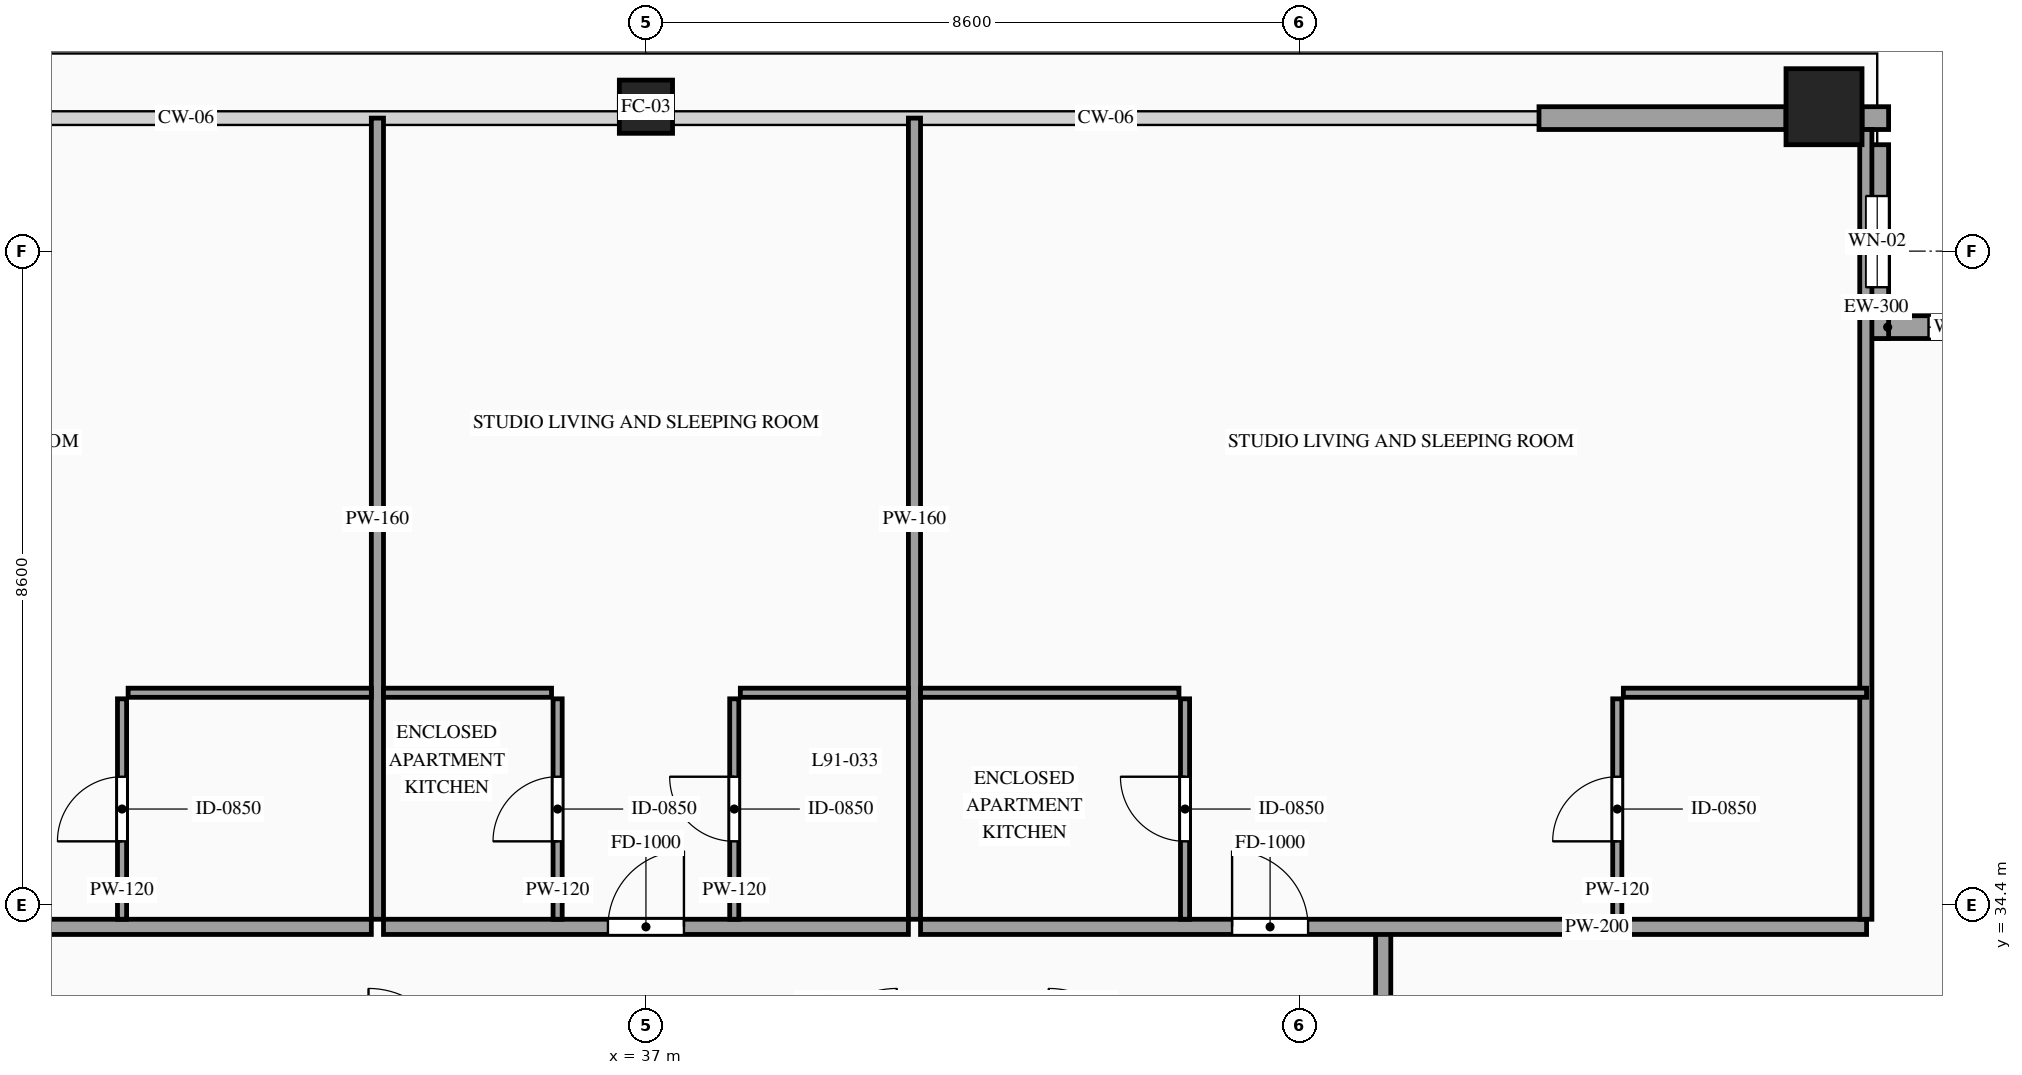
"""IFC4 building model, lengths in metres.
Left out: names, types, materials, properties, quantities, classifications, styles, units other than length and angle.
Written with IfcOpenShell. Run it as: python <this file> out.ifc"""

import sys

from ifc_helpers import new_model, si_unit, direction, frame, frame_2d, origin, origin_2d, place, context, subcontext, project, spatial, rectangle, hollow_rectangle, extrude, source, transform, mapped, element, fill, save


model = new_model("IFC4")
c1 = context("Model", 3, precision=1e-05, world=origin(), true_north=direction((0.0, 1.0)))
c2 = subcontext(c1, "Body", "Model", "MODEL_VIEW")
j1 = project(units=[si_unit("LENGTHUNIT", "METRE"), si_unit("PLANEANGLEUNIT", "RADIAN")], contexts=[c1])
p1 = place(None, origin())
s1 = spatial("IfcSite", under=j1, at=p1, CompositionType="ELEMENT")
p2 = place(p1, origin())
s2 = spatial("IfcBuilding", under=s1, at=p2, CompositionType="ELEMENT")
p3 = place(p2, frame((0.0, 0.0, 339.2)))
s3 = spatial("IfcBuildingStorey", under=s2, at=p3, CompositionType="ELEMENT", Elevation=339.2)
m1 = source(origin(), c2, "Body", "SweptSolid", [
    extrude(hollow_rectangle(XDim=0.7, YDim=0.7, WallThickness=0.032, at=origin_2d()), origin(), (0.0, 0.0, 1.0), 4.0),
])
p4 = place(p3, frame((37.0, 44.9, 0.0), z_axis=(0.0, 0.0, 1.0), x_axis=(1.0, 0.0, 0.0)))
e1 = element("IfcColumn", 1, at=p4, inside=s3, PredefinedType="COLUMN", context=c2, shape_type="MappedRepresentation", body=[
    mapped(m1, transform((0.0, 0.0, 0.0), scale=1.0)),
])
m2 = source(origin(), c2, "Body", "SweptSolid", [
    extrude(hollow_rectangle(XDim=1.0, YDim=1.0, WallThickness=0.048, at=origin_2d()), origin(), (0.0, 0.0, 1.0), 4.0),
])
p5 = place(p3, frame((52.5, 44.9, 0.0), z_axis=(0.0, 0.0, 1.0), x_axis=(1.0, 0.0, 0.0)))
e2 = element("IfcColumn", 2, at=p5, inside=s3, PredefinedType="COLUMN", context=c2, shape_type="MappedRepresentation", body=[
    mapped(m2, transform((0.0, 0.0, 0.0), scale=1.0)),
])
p6 = place(p3, frame((55.6, 42.0, 0.0), z_axis=(0.0, 0.0, 1.0), x_axis=(-1.0, 0.0, 0.0)))
e3 = element("IfcWall", 3, at=p6, inside=s3, PredefinedType="SOLIDWALL", context=c2, shape_type="SweptSolid", body=[
    extrude(rectangle(XDim=2.55, YDim=0.3, at=frame_2d((1.275, 0.0))), origin(), (0.0, 0.0, 1.0), 3.76),
])
p7 = place(p6, frame((0.825, 0.0, 0.85)))
e4 = element("IfcOpeningElement", 4, at=p7, cuts=e3, PredefinedType="OPENING", context=c2, shape_type="SweptSolid", body=[
    extrude(rectangle(XDim=0.9, YDim=1.5, at=frame_2d((0.45, 0.75))), frame((0.0, 0.165, 0.0), z_axis=(0.0, -1.0, 0.0), x_axis=(1.0, 0.0, 0.0)), (0.0, 0.0, 1.0), 0.33),
])
p8 = place(p3, frame((53.2, 41.85, 0.0), z_axis=(0.0, 0.0, 1.0), x_axis=(0.0, 1.0, 0.0)))
e5 = element("IfcWall", 5, at=p8, inside=s3, PredefinedType="SOLIDWALL", context=c2, shape_type="SweptSolid", body=[
    extrude(rectangle(XDim=2.55, YDim=0.3, at=frame_2d((1.275, 0.0))), origin(), (0.0, 0.0, 1.0), 3.76),
])
p9 = place(p8, frame((0.675, 0.0, 0.85)))
e6 = element("IfcOpeningElement", 6, at=p9, cuts=e5, PredefinedType="OPENING", context=c2, shape_type="SweptSolid", body=[
    extrude(rectangle(XDim=1.2, YDim=2.1, at=frame_2d((0.6, 1.05))), frame((0.0, 0.165, 0.0), z_axis=(0.0, -1.0, 0.0), x_axis=(1.0, 0.0, 0.0)), (0.0, 0.0, 1.0), 0.33),
])
m3 = source(origin(), c2, "Body", "SweptSolid", [
    extrude(rectangle(XDim=0.35, YDim=0.3, at=frame_2d((0.175, 0.0))), origin(), (0.0, 0.0, 1.0), 3.76),
])
p10 = place(p3, frame((53.0, 44.75, 0.0), z_axis=(0.0, 0.0, 1.0), x_axis=(1.0, 0.0, 0.0)))
e7 = element("IfcWall", 7, at=p10, inside=s3, PredefinedType="SOLIDWALL", context=c2, shape_type="MappedRepresentation", body=[
    mapped(m3, transform((0.0, 0.0, 0.0), scale=1.0)),
])
m4 = source(origin(), c2, "Body", "SweptSolid", [
    extrude(rectangle(XDim=3.25, YDim=0.3, at=frame_2d((1.625, 0.0))), origin(), (0.0, 0.0, 1.0), 3.365),
])
p11 = place(p3, frame((48.75, 44.75, 0.0), z_axis=(0.0, 0.0, 1.0), x_axis=(1.0, 0.0, 0.0)))
e8 = element("IfcWall", 8, at=p11, inside=s3, PredefinedType="SOLIDWALL", context=c2, shape_type="MappedRepresentation", body=[
    mapped(m4, transform((0.0, 0.0, 0.0), scale=1.0)),
])
m5 = source(origin(), c2, "Body", "SweptSolid", [
    extrude(rectangle(XDim=1.7, YDim=0.2, at=frame_2d((0.85, 0.0))), origin(), (0.0, 0.0, 1.0), 3.76),
])
p12 = place(p3, frame((46.7, 32.35, 0.0), z_axis=(0.0, 0.0, 1.0), x_axis=(0.0, 1.0, 0.0)))
e9 = element("IfcWall", 9, at=p12, inside=s3, PredefinedType="PARTITIONING", context=c2, shape_type="MappedRepresentation", body=[
    mapped(m5, transform((0.0, 0.0, 0.0), scale=1.0)),
])
p13 = place(p3, frame((20.94, 34.11, 0.0), z_axis=(0.0, 0.0, 1.0), x_axis=(1.0, 0.0, 0.0)))
e10 = element("IfcWall", 10, at=p13, inside=s3, PredefinedType="PARTITIONING", context=c2, shape_type="SweptSolid", body=[
    extrude(rectangle(XDim=12.447, YDim=0.2, at=frame_2d((6.224, 0.0))), origin(), (0.0, 0.0, 1.0), 3.76),
])
p14 = place(p13, frame((5.824, 0.0, 0.0)))
e11 = element("IfcOpeningElement", 11, at=p14, cuts=e10, PredefinedType="OPENING", context=c2, shape_type="SweptSolid", body=[
    extrude(rectangle(XDim=1.0, YDim=2.2, at=frame_2d((0.5, 1.1))), frame((0.0, 0.115, 0.0), z_axis=(0.0, -1.0, 0.0), x_axis=(1.0, 0.0, 0.0)), (0.0, 0.0, 1.0), 0.23),
])
m6 = source(origin(), c2, "Body", "SweptSolid", [
    extrude(rectangle(XDim=10.54, YDim=0.16, at=frame_2d((5.27, 0.0))), origin(), (0.0, 0.0, 1.0), 3.76),
])
p15 = place(p3, frame((33.467, 34.21, 0.0), z_axis=(0.0, 0.0, 1.0), x_axis=(0.0, 1.0, 0.0)))
e12 = element("IfcWall", 12, at=p15, inside=s3, PredefinedType="PARTITIONING", context=c2, shape_type="MappedRepresentation", body=[
    mapped(m6, transform((0.0, 0.0, 0.0), scale=1.0)),
])
m7 = source(origin(), c2, "Body", "SweptSolid", [
    extrude(rectangle(XDim=3.2, YDim=0.12, at=frame_2d((1.6, 0.0))), origin(), (0.0, 0.0, 1.0), 3.76),
])
p16 = place(p3, frame((30.187, 37.19, 0.0), z_axis=(0.0, 0.0, 1.0), x_axis=(1.0, 0.0, 0.0)))
e13 = element("IfcWall", 13, at=p16, inside=s3, PredefinedType="PARTITIONING", context=c2, shape_type="MappedRepresentation", body=[
    mapped(m7, transform((0.0, 0.0, 0.0), scale=1.0)),
])
p17 = place(p3, frame((30.107, 34.21, 0.0), z_axis=(0.0, 0.0, 1.0), x_axis=(0.0, 1.0, 0.0)))
e14 = element("IfcWall", 14, at=p17, inside=s3, PredefinedType="PARTITIONING", context=c2, shape_type="SweptSolid", body=[
    extrude(rectangle(XDim=2.9, YDim=0.12, at=frame_2d((1.45, 0.0))), origin(), (0.0, 0.0, 1.0), 3.76),
])
p18 = place(p17, frame((1.025, 0.0, 0.0)))
e15 = element("IfcOpeningElement", 15, at=p18, cuts=e14, PredefinedType="OPENING", context=c2, shape_type="SweptSolid", body=[
    extrude(rectangle(XDim=0.85, YDim=2.1, at=frame_2d((0.425, 1.05))), frame((0.0, 0.075, 0.0), z_axis=(0.0, -1.0, 0.0), x_axis=(1.0, 0.0, 0.0)), (0.0, 0.0, 1.0), 0.15),
])
p19 = place(p3, frame((33.547, 34.11, 0.0), z_axis=(0.0, 0.0, 1.0), x_axis=(1.0, 0.0, 0.0)))
e16 = element("IfcWall", 16, at=p19, inside=s3, PredefinedType="PARTITIONING", context=c2, shape_type="SweptSolid", body=[
    extrude(rectangle(XDim=6.906, YDim=0.2, at=frame_2d((3.453, 0.0))), origin(), (0.0, 0.0, 1.0), 3.76),
])
p20 = place(p19, frame((2.953, 0.0, 0.0)))
e17 = element("IfcOpeningElement", 17, at=p20, cuts=e16, PredefinedType="OPENING", context=c2, shape_type="SweptSolid", body=[
    extrude(rectangle(XDim=1.0, YDim=2.2, at=frame_2d((0.5, 1.1))), frame((0.0, 0.115, 0.0), z_axis=(0.0, -1.0, 0.0), x_axis=(1.0, 0.0, 0.0)), (0.0, 0.0, 1.0), 0.23),
])
p21 = place(p3, frame((40.533, 34.21, 0.0), z_axis=(0.0, 0.0, 1.0), x_axis=(0.0, 1.0, 0.0)))
e18 = element("IfcWall", 18, at=p21, inside=s3, PredefinedType="PARTITIONING", context=c2, shape_type="MappedRepresentation", body=[
    mapped(m6, transform((0.0, 0.0, 0.0), scale=1.0)),
])
m8 = source(origin(), c2, "Body", "SweptSolid", [
    extrude(rectangle(XDim=2.211, YDim=0.12, at=frame_2d((1.105, 0.0))), origin(), (0.0, 0.0, 1.0), 3.76),
])
p22 = place(p3, frame((33.547, 37.19, 0.0), z_axis=(0.0, 0.0, 1.0), x_axis=(1.0, 0.0, 0.0)))
e19 = element("IfcWall", 19, at=p22, inside=s3, PredefinedType="PARTITIONING", context=c2, shape_type="MappedRepresentation", body=[
    mapped(m8, transform((0.0, 0.0, 0.0), scale=1.0)),
])
p23 = place(p3, frame((35.838, 34.21, 0.0), z_axis=(0.0, 0.0, 1.0), x_axis=(0.0, 1.0, 0.0)))
e20 = element("IfcWall", 20, at=p23, inside=s3, PredefinedType="PARTITIONING", context=c2, shape_type="SweptSolid", body=[
    extrude(rectangle(XDim=2.9, YDim=0.12, at=frame_2d((1.45, 0.0))), origin(), (0.0, 0.0, 1.0), 3.76),
])
p24 = place(p23, frame((1.025, 0.0, 0.0)))
e21 = element("IfcOpeningElement", 21, at=p24, cuts=e20, PredefinedType="OPENING", context=c2, shape_type="SweptSolid", body=[
    extrude(rectangle(XDim=0.85, YDim=2.1, at=frame_2d((0.425, 1.05))), frame((0.0, 0.075, 0.0), z_axis=(0.0, -1.0, 0.0), x_axis=(1.0, 0.0, 0.0)), (0.0, 0.0, 1.0), 0.15),
])
p25 = place(p3, frame((38.242, 37.19, 0.0), z_axis=(0.0, 0.0, 1.0), x_axis=(1.0, 0.0, 0.0)))
e22 = element("IfcWall", 22, at=p25, inside=s3, PredefinedType="PARTITIONING", context=c2, shape_type="MappedRepresentation", body=[
    mapped(m8, transform((0.0, 0.0, 0.0), scale=1.0)),
])
p26 = place(p3, frame((38.162, 34.21, 0.0), z_axis=(0.0, 0.0, 1.0), x_axis=(0.0, 1.0, 0.0)))
e23 = element("IfcWall", 23, at=p26, inside=s3, PredefinedType="PARTITIONING", context=c2, shape_type="SweptSolid", body=[
    extrude(rectangle(XDim=2.9, YDim=0.12, at=frame_2d((1.45, 0.0))), origin(), (0.0, 0.0, 1.0), 3.76),
])
p27 = place(p26, frame((1.025, 0.0, 0.0)))
e24 = element("IfcOpeningElement", 24, at=p27, cuts=e23, PredefinedType="OPENING", context=c2, shape_type="SweptSolid", body=[
    extrude(rectangle(XDim=0.85, YDim=2.1, at=frame_2d((0.425, 1.05))), frame((0.0, 0.075, 0.0), z_axis=(0.0, -1.0, 0.0), x_axis=(1.0, 0.0, 0.0)), (0.0, 0.0, 1.0), 0.15),
])
p28 = place(p3, frame((40.613, 34.11, 0.0), z_axis=(0.0, 0.0, 1.0), x_axis=(1.0, 0.0, 0.0)))
e25 = element("IfcWall", 25, at=p28, inside=s3, PredefinedType="PARTITIONING", context=c2, shape_type="SweptSolid", body=[
    extrude(rectangle(XDim=12.447, YDim=0.2, at=frame_2d((6.224, 0.0))), origin(), (0.0, 0.0, 1.0), 3.76),
])
p29 = place(p28, frame((4.099, 0.0, 0.0)))
e26 = element("IfcOpeningElement", 26, at=p29, cuts=e25, PredefinedType="OPENING", context=c2, shape_type="SweptSolid", body=[
    extrude(rectangle(XDim=1.0, YDim=2.2, at=frame_2d((0.5, 1.1))), frame((0.0, 0.115, 0.0), z_axis=(0.0, -1.0, 0.0), x_axis=(1.0, 0.0, 0.0)), (0.0, 0.0, 1.0), 0.23),
])
m9 = source(origin(), c2, "Body", "SweptSolid", [
    extrude(rectangle(XDim=10.39, YDim=0.16, at=frame_2d((5.195, 0.0))), origin(), (0.0, 0.0, 1.0), 3.76),
])
p30 = place(p3, frame((53.05, 34.21, 0.0), z_axis=(0.0, 0.0, 1.0), x_axis=(0.0, 1.0, 0.0)))
e27 = element("IfcWall", 27, at=p30, inside=s3, PredefinedType="PARTITIONING", context=c2, shape_type="MappedRepresentation", body=[
    mapped(m9, transform((0.0, 0.0, 0.0), scale=1.0)),
])
m10 = source(origin(), c2, "Body", "SweptSolid", [
    extrude(rectangle(XDim=3.4, YDim=0.12, at=frame_2d((1.7, 0.0))), origin(), (0.0, 0.0, 1.0), 3.76),
])
p31 = place(p3, frame((40.613, 37.19, 0.0), z_axis=(0.0, 0.0, 1.0), x_axis=(1.0, 0.0, 0.0)))
e28 = element("IfcWall", 28, at=p31, inside=s3, PredefinedType="PARTITIONING", context=c2, shape_type="MappedRepresentation", body=[
    mapped(m10, transform((0.0, 0.0, 0.0), scale=1.0)),
])
p32 = place(p3, frame((44.093, 34.21, 0.0), z_axis=(0.0, 0.0, 1.0), x_axis=(0.0, 1.0, 0.0)))
e29 = element("IfcWall", 29, at=p32, inside=s3, PredefinedType="PARTITIONING", context=c2, shape_type="SweptSolid", body=[
    extrude(rectangle(XDim=2.9, YDim=0.12, at=frame_2d((1.45, 0.0))), origin(), (0.0, 0.0, 1.0), 3.76),
])
p33 = place(p32, frame((1.025, 0.0, 0.0)))
e30 = element("IfcOpeningElement", 30, at=p33, cuts=e29, PredefinedType="OPENING", context=c2, shape_type="SweptSolid", body=[
    extrude(rectangle(XDim=0.85, YDim=2.1, at=frame_2d((0.425, 1.05))), frame((0.0, 0.075, 0.0), z_axis=(0.0, -1.0, 0.0), x_axis=(1.0, 0.0, 0.0)), (0.0, 0.0, 1.0), 0.15),
])
p34 = place(p3, frame((49.86, 37.19, 0.0), z_axis=(0.0, 0.0, 1.0), x_axis=(1.0, 0.0, 0.0)))
e31 = element("IfcWall", 31, at=p34, inside=s3, PredefinedType="PARTITIONING", context=c2, shape_type="MappedRepresentation", body=[
    mapped(m7, transform((0.0, 0.0, 0.0), scale=1.0)),
])
p35 = place(p3, frame((49.78, 34.21, 0.0), z_axis=(0.0, 0.0, 1.0), x_axis=(0.0, 1.0, 0.0)))
e32 = element("IfcWall", 32, at=p35, inside=s3, PredefinedType="PARTITIONING", context=c2, shape_type="SweptSolid", body=[
    extrude(rectangle(XDim=2.9, YDim=0.12, at=frame_2d((1.45, 0.0))), origin(), (0.0, 0.0, 1.0), 3.76),
])
p36 = place(p35, frame((1.025, 0.0, 0.0)))
e33 = element("IfcOpeningElement", 33, at=p36, cuts=e32, PredefinedType="OPENING", context=c2, shape_type="SweptSolid", body=[
    extrude(rectangle(XDim=0.85, YDim=2.1, at=frame_2d((0.425, 1.05))), frame((0.0, 0.075, 0.0), z_axis=(0.0, -1.0, 0.0), x_axis=(1.0, 0.0, 0.0)), (0.0, 0.0, 1.0), 0.15),
])
m11 = source(origin(), c2, "Body", "SweptSolid", [
    extrude(rectangle(XDim=0.9, YDim=1.5, at=frame_2d((0.45, 0.75))), frame((0.0, 0.03, 0.0), z_axis=(0.0, -1.0, 0.0), x_axis=(1.0, 0.0, 0.0)), (0.0, 0.0, 1.0), 0.06),
])
p37 = place(p7, origin())
e34 = element("IfcWindow", 34, at=p37, inside=s3, PartitioningType="SINGLE_PANEL", PredefinedType="WINDOW", context=c2, shape_type="MappedRepresentation", body=[
    mapped(m11, transform((0.0, 0.0, 0.0), scale=1.0)),
])
fill(e4, e34)
m12 = source(origin(), c2, "Body", "SweptSolid", [
    extrude(rectangle(XDim=1.2, YDim=2.1, at=frame_2d((0.6, 1.05))), frame((0.0, 0.03, 0.0), z_axis=(0.0, -1.0, 0.0), x_axis=(1.0, 0.0, 0.0)), (0.0, 0.0, 1.0), 0.06),
])
p38 = place(p9, origin())
e35 = element("IfcWindow", 35, at=p38, inside=s3, PartitioningType="SINGLE_PANEL", PredefinedType="WINDOW", context=c2, shape_type="MappedRepresentation", body=[
    mapped(m12, transform((0.0, 0.0, 0.0), scale=1.0)),
])
fill(e6, e35)
m13 = source(origin(), c2, "Body", "SweptSolid", [
    extrude(rectangle(XDim=0.85, YDim=2.1, at=frame_2d((0.425, 1.05))), frame((0.0, 0.025, 0.0), z_axis=(0.0, -1.0, 0.0), x_axis=(1.0, 0.0, 0.0)), (0.0, 0.0, 1.0), 0.05),
])
p39 = place(p18, origin())
e36 = element("IfcDoor", 36, at=p39, inside=s3, OperationType="SINGLE_SWING_LEFT", PredefinedType="DOOR", context=c2, shape_type="MappedRepresentation", body=[
    mapped(m13, transform((0.0, 0.0, 0.0), scale=1.0)),
])
fill(e15, e36)
m14 = source(origin(), c2, "Body", "SweptSolid", [
    extrude(rectangle(XDim=1.0, YDim=2.2, at=frame_2d((0.5, 1.1))), frame((0.0, 0.025, 0.0), z_axis=(0.0, -1.0, 0.0), x_axis=(1.0, 0.0, 0.0)), (0.0, 0.0, 1.0), 0.05),
])
p40 = place(p20, origin())
e37 = element("IfcDoor", 37, at=p40, inside=s3, OperationType="SINGLE_SWING_RIGHT", PredefinedType="DOOR", context=c2, shape_type="MappedRepresentation", body=[
    mapped(m14, transform((0.0, 0.0, 0.0), scale=1.0)),
])
fill(e17, e37)
p41 = place(p24, origin())
e38 = element("IfcDoor", 38, at=p41, inside=s3, OperationType="SINGLE_SWING_LEFT", PredefinedType="DOOR", context=c2, shape_type="MappedRepresentation", body=[
    mapped(m13, transform((0.0, 0.0, 0.0), scale=1.0)),
])
fill(e21, e38)
p42 = place(p27, origin())
e39 = element("IfcDoor", 39, at=p42, inside=s3, OperationType="SINGLE_SWING_RIGHT", PredefinedType="DOOR", context=c2, shape_type="MappedRepresentation", body=[
    mapped(m13, transform((0.0, 0.0, 0.0), scale=1.0)),
])
fill(e24, e39)
p43 = place(p29, origin())
e40 = element("IfcDoor", 40, at=p43, inside=s3, OperationType="SINGLE_SWING_LEFT", PredefinedType="DOOR", context=c2, shape_type="MappedRepresentation", body=[
    mapped(m14, transform((0.0, 0.0, 0.0), scale=1.0)),
])
fill(e26, e40)
p44 = place(p33, origin())
e41 = element("IfcDoor", 41, at=p44, inside=s3, OperationType="SINGLE_SWING_RIGHT", PredefinedType="DOOR", context=c2, shape_type="MappedRepresentation", body=[
    mapped(m13, transform((0.0, 0.0, 0.0), scale=1.0)),
])
fill(e30, e41)
p45 = place(p36, origin())
e42 = element("IfcDoor", 42, at=p45, inside=s3, OperationType="SINGLE_SWING_LEFT", PredefinedType="DOOR", context=c2, shape_type="MappedRepresentation", body=[
    mapped(m13, transform((0.0, 0.0, 0.0), scale=1.0)),
])
fill(e33, e42)
save(model, sys.argv[1])
